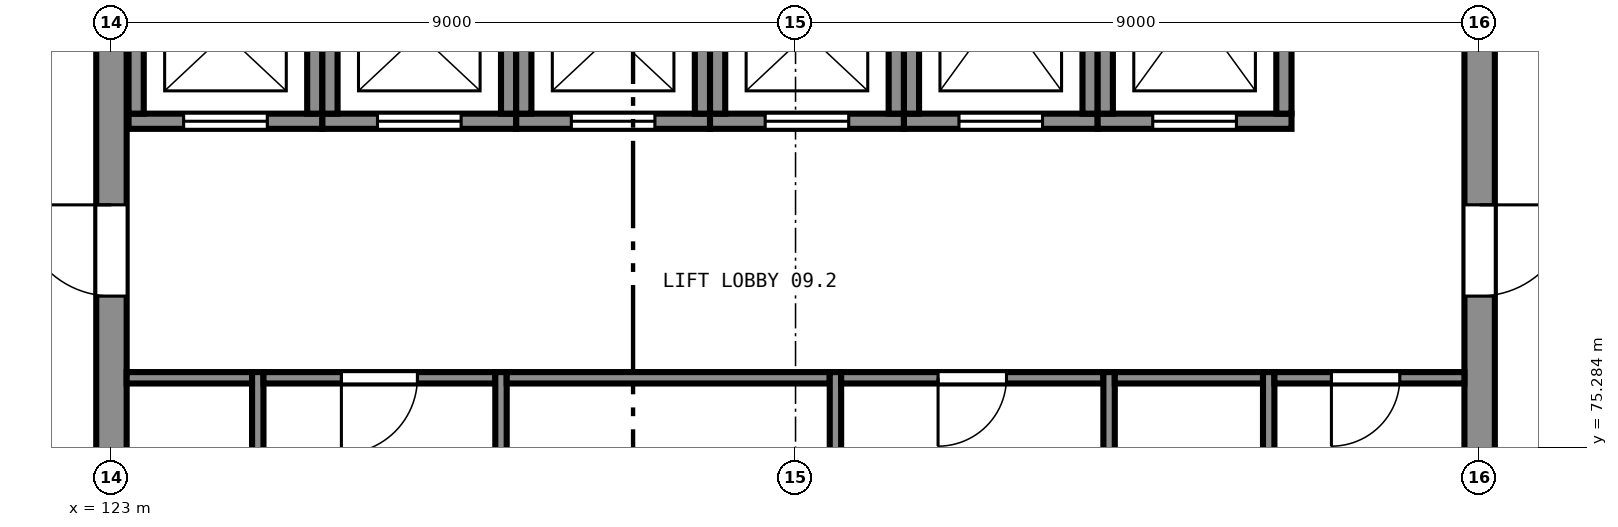
"""IFC4 building model, lengths in metres.
Left out: names, types, materials, properties, quantities, classifications, styles, units other than length and angle.
Written with IfcOpenShell. Run it as: python <this file> out.ifc"""

import sys

from ifc_helpers import new_model, si_unit, direction, frame, frame_2d, origin, place, context, subcontext, project, spatial, rectangle, extrude, element, fill, save


model = new_model("IFC4")
c1 = context("Model", 3, precision=1e-05, world=origin(), true_north=direction((0.0, 1.0)))
c2 = subcontext(c1, "Body", "Model", "MODEL_VIEW")
j1 = project(units=[si_unit("LENGTHUNIT", "METRE"), si_unit("PLANEANGLEUNIT", "RADIAN")], contexts=[c1])
p1 = place(None, origin())
s1 = spatial("IfcSite", under=j1, at=p1, CompositionType="ELEMENT")
p2 = place(p1, origin())
s2 = spatial("IfcBuilding", under=s1, at=p2, CompositionType="ELEMENT")
p3 = place(p2, frame((0.0, 0.0, 37.5)))
s3 = spatial("IfcBuildingStorey", under=s2, at=p3, CompositionType="ELEMENT", Elevation=37.5)
p4 = place(p3, frame((141.0, 65.2, 0.0), z_axis=(0.0, 0.0, 1.0), x_axis=(0.0, 1.0, 0.0)))
e1 = element("IfcWall", 1, at=p4, inside=s3, PredefinedType="SHEAR", context=c2, shape_type="SweptSolid", body=[
    extrude(rectangle(XDim=17.6, YDim=0.4, at=frame_2d((8.8, 0.0))), origin(), (0.0, 0.0, 1.0), 4.0),
])
p5 = place(p4, frame((4.325, 0.0, 0.0)))
e2 = element("IfcOpeningElement", 2, at=p5, cuts=e1, PredefinedType="OPENING", context=c2, shape_type="SweptSolid", body=[
    extrude(rectangle(XDim=1.2, YDim=2.1, at=frame_2d((0.6, 1.05))), frame((0.0, 0.21, 0.0), z_axis=(0.0, -1.0, 0.0), x_axis=(1.0, 0.0, 0.0)), (0.0, 0.0, 1.0), 0.42),
])
p6 = place(p4, frame((12.075, 0.0, 0.0)))
e3 = element("IfcOpeningElement", 3, at=p6, cuts=e1, PredefinedType="OPENING", context=c2, shape_type="SweptSolid", body=[
    extrude(rectangle(XDim=1.2, YDim=2.1, at=frame_2d((0.6, 1.05))), frame((0.0, 0.21, 0.0), z_axis=(0.0, -1.0, 0.0), x_axis=(1.0, 0.0, 0.0)), (0.0, 0.0, 1.0), 0.42),
])
p7 = place(p3, frame((123.0, 82.8, 0.0), z_axis=(0.0, 0.0, 1.0), x_axis=(0.0, -1.0, 0.0)))
e4 = element("IfcWall", 4, at=p7, inside=s3, PredefinedType="SHEAR", context=c2, shape_type="SweptSolid", body=[
    extrude(rectangle(XDim=17.6, YDim=0.4, at=frame_2d((8.8, 0.0))), origin(), (0.0, 0.0, 1.0), 4.0),
])
p8 = place(p7, frame((12.075, 0.0, 0.0)))
e5 = element("IfcOpeningElement", 5, at=p8, cuts=e4, PredefinedType="OPENING", context=c2, shape_type="SweptSolid", body=[
    extrude(rectangle(XDim=1.2, YDim=2.1, at=frame_2d((0.6, 1.05))), frame((0.0, 0.21, 0.0), z_axis=(0.0, -1.0, 0.0), x_axis=(1.0, 0.0, 0.0)), (0.0, 0.0, 1.0), 0.42),
])
p9 = place(p7, frame((4.325, 0.0, 0.0)))
e6 = element("IfcOpeningElement", 6, at=p9, cuts=e4, PredefinedType="OPENING", context=c2, shape_type="SweptSolid", body=[
    extrude(rectangle(XDim=1.2, YDim=2.1, at=frame_2d((0.6, 1.05))), frame((0.0, 0.21, 0.0), z_axis=(0.0, -1.0, 0.0), x_axis=(1.0, 0.0, 0.0)), (0.0, 0.0, 1.0), 0.42),
])
p10 = place(p3, frame((123.225, 79.575, 0.0), z_axis=(0.0, 0.0, 1.0), x_axis=(1.0, 0.0, 0.0)))
e7 = element("IfcWall", 7, at=p10, inside=s3, PredefinedType="SHEAR", context=c2, shape_type="SweptSolid", body=[
    extrude(rectangle(XDim=2.55, YDim=0.2, at=frame_2d((1.275, 0.0))), origin(), (0.0, 0.0, 1.0), 4.0),
])
p11 = place(p10, frame((0.725, 0.0, 0.0)))
e8 = element("IfcOpeningElement", 8, at=p11, cuts=e7, PredefinedType="OPENING", context=c2, shape_type="SweptSolid", body=[
    extrude(rectangle(XDim=1.1, YDim=2.1, at=frame_2d((0.55, 1.05))), frame((0.0, 0.11, 0.0), z_axis=(0.0, -1.0, 0.0), x_axis=(1.0, 0.0, 0.0)), (0.0, 0.0, 1.0), 0.22),
])
for number, where, z_axis, x_axis in (
    (9, (125.675, 79.675, 0.0), (0.0, 0.0, 1.0), (0.0, 1.0, 0.0)),
    (10, (123.325, 81.775, 0.0), (0.0, 0.0, 1.0), (0.0, -1.0, 0.0)),
):
    element("IfcWall", number, at=place(p3, frame(where, z_axis=z_axis, x_axis=x_axis)), inside=s3, PredefinedType="SHEAR", context=c2, shape_type="SweptSolid", body=[
        extrude(rectangle(XDim=2.1, YDim=0.2, at=frame_2d((1.05, 0.0))), origin(), (0.0, 0.0, 1.0), 4.0),
    ])
p12 = place(p3, frame((125.775, 79.575, 0.0), z_axis=(0.0, 0.0, 1.0), x_axis=(1.0, 0.0, 0.0)))
e11 = element("IfcWall", 11, at=p12, inside=s3, PredefinedType="SHEAR", context=c2, shape_type="SweptSolid", body=[
    extrude(rectangle(XDim=2.55, YDim=0.2, at=frame_2d((1.275, 0.0))), origin(), (0.0, 0.0, 1.0), 4.0),
])
p13 = place(p12, frame((0.725, 0.0, 0.0)))
e12 = element("IfcOpeningElement", 12, at=p13, cuts=e11, PredefinedType="OPENING", context=c2, shape_type="SweptSolid", body=[
    extrude(rectangle(XDim=1.1, YDim=2.1, at=frame_2d((0.55, 1.05))), frame((0.0, 0.11, 0.0), z_axis=(0.0, -1.0, 0.0), x_axis=(1.0, 0.0, 0.0)), (0.0, 0.0, 1.0), 0.22),
])
for number, where, z_axis, x_axis in (
    (13, (128.225, 79.675, 0.0), (0.0, 0.0, 1.0), (0.0, 1.0, 0.0)),
    (14, (125.875, 81.775, 0.0), (0.0, 0.0, 1.0), (0.0, -1.0, 0.0)),
):
    element("IfcWall", number, at=place(p3, frame(where, z_axis=z_axis, x_axis=x_axis)), inside=s3, PredefinedType="SHEAR", context=c2, shape_type="SweptSolid", body=[
        extrude(rectangle(XDim=2.1, YDim=0.2, at=frame_2d((1.05, 0.0))), origin(), (0.0, 0.0, 1.0), 4.0),
    ])
p14 = place(p3, frame((128.325, 79.575, 0.0), z_axis=(0.0, 0.0, 1.0), x_axis=(1.0, 0.0, 0.0)))
e15 = element("IfcWall", 15, at=p14, inside=s3, PredefinedType="SHEAR", context=c2, shape_type="SweptSolid", body=[
    extrude(rectangle(XDim=2.55, YDim=0.2, at=frame_2d((1.275, 0.0))), origin(), (0.0, 0.0, 1.0), 4.0),
])
p15 = place(p14, frame((0.725, 0.0, 0.0)))
e16 = element("IfcOpeningElement", 16, at=p15, cuts=e15, PredefinedType="OPENING", context=c2, shape_type="SweptSolid", body=[
    extrude(rectangle(XDim=1.1, YDim=2.1, at=frame_2d((0.55, 1.05))), frame((0.0, 0.11, 0.0), z_axis=(0.0, -1.0, 0.0), x_axis=(1.0, 0.0, 0.0)), (0.0, 0.0, 1.0), 0.22),
])
for number, where, z_axis, x_axis in (
    (17, (130.775, 79.675, 0.0), (0.0, 0.0, 1.0), (0.0, 1.0, 0.0)),
    (18, (128.425, 81.775, 0.0), (0.0, 0.0, 1.0), (0.0, -1.0, 0.0)),
):
    element("IfcWall", number, at=place(p3, frame(where, z_axis=z_axis, x_axis=x_axis)), inside=s3, PredefinedType="SHEAR", context=c2, shape_type="SweptSolid", body=[
        extrude(rectangle(XDim=2.1, YDim=0.2, at=frame_2d((1.05, 0.0))), origin(), (0.0, 0.0, 1.0), 4.0),
    ])
p16 = place(p3, frame((130.875, 79.575, 0.0), z_axis=(0.0, 0.0, 1.0), x_axis=(1.0, 0.0, 0.0)))
e19 = element("IfcWall", 19, at=p16, inside=s3, PredefinedType="SHEAR", context=c2, shape_type="SweptSolid", body=[
    extrude(rectangle(XDim=2.55, YDim=0.2, at=frame_2d((1.275, 0.0))), origin(), (0.0, 0.0, 1.0), 4.0),
])
p17 = place(p16, frame((0.725, 0.0, 0.0)))
e20 = element("IfcOpeningElement", 20, at=p17, cuts=e19, PredefinedType="OPENING", context=c2, shape_type="SweptSolid", body=[
    extrude(rectangle(XDim=1.1, YDim=2.1, at=frame_2d((0.55, 1.05))), frame((0.0, 0.11, 0.0), z_axis=(0.0, -1.0, 0.0), x_axis=(1.0, 0.0, 0.0)), (0.0, 0.0, 1.0), 0.22),
])
for number, where, z_axis, x_axis in (
    (21, (133.325, 79.675, 0.0), (0.0, 0.0, 1.0), (0.0, 1.0, 0.0)),
    (22, (130.975, 81.775, 0.0), (0.0, 0.0, 1.0), (0.0, -1.0, 0.0)),
):
    element("IfcWall", number, at=place(p3, frame(where, z_axis=z_axis, x_axis=x_axis)), inside=s3, PredefinedType="SHEAR", context=c2, shape_type="SweptSolid", body=[
        extrude(rectangle(XDim=2.1, YDim=0.2, at=frame_2d((1.05, 0.0))), origin(), (0.0, 0.0, 1.0), 4.0),
    ])
p18 = place(p3, frame((133.425, 79.575, 0.0), z_axis=(0.0, 0.0, 1.0), x_axis=(1.0, 0.0, 0.0)))
e23 = element("IfcWall", 23, at=p18, inside=s3, PredefinedType="SHEAR", context=c2, shape_type="SweptSolid", body=[
    extrude(rectangle(XDim=2.55, YDim=0.2, at=frame_2d((1.275, 0.0))), origin(), (0.0, 0.0, 1.0), 4.0),
])
p19 = place(p18, frame((0.725, 0.0, 0.0)))
e24 = element("IfcOpeningElement", 24, at=p19, cuts=e23, PredefinedType="OPENING", context=c2, shape_type="SweptSolid", body=[
    extrude(rectangle(XDim=1.1, YDim=2.1, at=frame_2d((0.55, 1.05))), frame((0.0, 0.11, 0.0), z_axis=(0.0, -1.0, 0.0), x_axis=(1.0, 0.0, 0.0)), (0.0, 0.0, 1.0), 0.22),
])
for number, where, z_axis, x_axis in (
    (25, (135.875, 79.675, 0.0), (0.0, 0.0, 1.0), (0.0, 1.0, 0.0)),
    (26, (133.525, 82.475, 0.0), (0.0, 0.0, 1.0), (0.0, -1.0, 0.0)),
):
    element("IfcWall", number, at=place(p3, frame(where, z_axis=z_axis, x_axis=x_axis)), inside=s3, PredefinedType="SHEAR", context=c2, shape_type="SweptSolid", body=[
        extrude(rectangle(XDim=2.8, YDim=0.2, at=frame_2d((1.4, 0.0))), origin(), (0.0, 0.0, 1.0), 4.0),
    ])
p20 = place(p3, frame((135.975, 79.575, 0.0), z_axis=(0.0, 0.0, 1.0), x_axis=(1.0, 0.0, 0.0)))
e27 = element("IfcWall", 27, at=p20, inside=s3, PredefinedType="SHEAR", context=c2, shape_type="SweptSolid", body=[
    extrude(rectangle(XDim=2.55, YDim=0.2, at=frame_2d((1.275, 0.0))), origin(), (0.0, 0.0, 1.0), 4.0),
])
p21 = place(p20, frame((0.725, 0.0, 0.0)))
e28 = element("IfcOpeningElement", 28, at=p21, cuts=e27, PredefinedType="OPENING", context=c2, shape_type="SweptSolid", body=[
    extrude(rectangle(XDim=1.1, YDim=2.1, at=frame_2d((0.55, 1.05))), frame((0.0, 0.11, 0.0), z_axis=(0.0, -1.0, 0.0), x_axis=(1.0, 0.0, 0.0)), (0.0, 0.0, 1.0), 0.22),
])
for number, where, z_axis, x_axis in (
    (29, (138.425, 79.675, 0.0), (0.0, 0.0, 1.0), (0.0, 1.0, 0.0)),
    (30, (136.075, 82.475, 0.0), (0.0, 0.0, 1.0), (0.0, -1.0, 0.0)),
):
    element("IfcWall", number, at=place(p3, frame(where, z_axis=z_axis, x_axis=x_axis)), inside=s3, PredefinedType="SHEAR", context=c2, shape_type="SweptSolid", body=[
        extrude(rectangle(XDim=2.8, YDim=0.2, at=frame_2d((1.4, 0.0))), origin(), (0.0, 0.0, 1.0), 4.0),
    ])
p22 = place(p3, frame((124.925, 71.725, 0.0), z_axis=(0.0, 0.0, 1.0), x_axis=(0.0, 1.0, 0.0)))
e31 = element("IfcWall", 31, at=p22, inside=s3, PredefinedType="PARTITIONING", context=c2, shape_type="SweptSolid", body=[
    extrude(rectangle(XDim=4.55, YDim=0.15, at=frame_2d((2.275, 0.0))), origin(), (0.0, 0.0, 1.0), 3.58),
])
p23 = place(p3, frame((123.2, 76.2, 0.0), z_axis=(0.0, 0.0, 1.0), x_axis=(1.0, 0.0, 0.0)))
e32 = element("IfcWall", 32, at=p23, inside=s3, PredefinedType="PARTITIONING", context=c2, shape_type="SweptSolid", body=[
    extrude(rectangle(XDim=1.65, YDim=0.15, at=frame_2d((0.825, 0.0))), origin(), (0.0, 0.0, 1.0), 3.58),
])
p24 = place(p3, frame((128.125, 71.725, 0.0), z_axis=(0.0, 0.0, 1.0), x_axis=(0.0, 1.0, 0.0)))
e33 = element("IfcWall", 33, at=p24, inside=s3, PredefinedType="PARTITIONING", context=c2, shape_type="SweptSolid", body=[
    extrude(rectangle(XDim=4.55, YDim=0.15, at=frame_2d((2.275, 0.0))), origin(), (0.0, 0.0, 1.0), 3.58),
])
p25 = place(p3, frame((125.0, 76.2, 0.0), z_axis=(0.0, 0.0, 1.0), x_axis=(1.0, 0.0, 0.0)))
e34 = element("IfcWall", 34, at=p25, inside=s3, PredefinedType="PARTITIONING", context=c2, shape_type="SweptSolid", body=[
    extrude(rectangle(XDim=3.05, YDim=0.15, at=frame_2d((1.525, 0.0))), origin(), (0.0, 0.0, 1.0), 3.58),
])
p26 = place(p25, frame((1.025, 0.0, 0.0)))
e35 = element("IfcOpeningElement", 35, at=p26, cuts=e34, PredefinedType="OPENING", context=c2, shape_type="SweptSolid", body=[
    extrude(rectangle(XDim=1.0, YDim=2.1, at=frame_2d((0.5, 1.05))), frame((0.0, 0.085, 0.0), z_axis=(0.0, -1.0, 0.0), x_axis=(1.0, 0.0, 0.0)), (0.0, 0.0, 1.0), 0.17),
])
p27 = place(p3, frame((132.525, 71.725, 0.0), z_axis=(0.0, 0.0, 1.0), x_axis=(0.0, 1.0, 0.0)))
e36 = element("IfcWall", 36, at=p27, inside=s3, PredefinedType="PARTITIONING", context=c2, shape_type="SweptSolid", body=[
    extrude(rectangle(XDim=4.55, YDim=0.15, at=frame_2d((2.275, 0.0))), origin(), (0.0, 0.0, 1.0), 3.58),
])
p28 = place(p3, frame((128.2, 76.2, 0.0), z_axis=(0.0, 0.0, 1.0), x_axis=(1.0, 0.0, 0.0)))
e37 = element("IfcWall", 37, at=p28, inside=s3, PredefinedType="PARTITIONING", context=c2, shape_type="SweptSolid", body=[
    extrude(rectangle(XDim=4.25, YDim=0.15, at=frame_2d((2.125, 0.0))), origin(), (0.0, 0.0, 1.0), 3.58),
])
p29 = place(p3, frame((136.125, 71.725, 0.0), z_axis=(0.0, 0.0, 1.0), x_axis=(0.0, 1.0, 0.0)))
e38 = element("IfcWall", 38, at=p29, inside=s3, PredefinedType="PARTITIONING", context=c2, shape_type="SweptSolid", body=[
    extrude(rectangle(XDim=4.55, YDim=0.15, at=frame_2d((2.275, 0.0))), origin(), (0.0, 0.0, 1.0), 3.58),
])
p30 = place(p3, frame((132.6, 76.2, 0.0), z_axis=(0.0, 0.0, 1.0), x_axis=(1.0, 0.0, 0.0)))
e39 = element("IfcWall", 39, at=p30, inside=s3, PredefinedType="PARTITIONING", context=c2, shape_type="SweptSolid", body=[
    extrude(rectangle(XDim=3.45, YDim=0.15, at=frame_2d((1.725, 0.0))), origin(), (0.0, 0.0, 1.0), 3.58),
])
p31 = place(p30, frame((1.275, 0.0, 0.0)))
e40 = element("IfcOpeningElement", 40, at=p31, cuts=e39, PredefinedType="OPENING", context=c2, shape_type="SweptSolid", body=[
    extrude(rectangle(XDim=0.9, YDim=2.1, at=frame_2d((0.45, 1.05))), frame((0.0, 0.085, 0.0), z_axis=(0.0, -1.0, 0.0), x_axis=(1.0, 0.0, 0.0)), (0.0, 0.0, 1.0), 0.17),
])
p32 = place(p3, frame((138.225, 71.725, 0.0), z_axis=(0.0, 0.0, 1.0), x_axis=(0.0, 1.0, 0.0)))
e41 = element("IfcWall", 41, at=p32, inside=s3, PredefinedType="PARTITIONING", context=c2, shape_type="SweptSolid", body=[
    extrude(rectangle(XDim=4.55, YDim=0.15, at=frame_2d((2.275, 0.0))), origin(), (0.0, 0.0, 1.0), 3.58),
])
p33 = place(p3, frame((136.2, 76.2, 0.0), z_axis=(0.0, 0.0, 1.0), x_axis=(1.0, 0.0, 0.0)))
e42 = element("IfcWall", 42, at=p33, inside=s3, PredefinedType="PARTITIONING", context=c2, shape_type="SweptSolid", body=[
    extrude(rectangle(XDim=1.95, YDim=0.15, at=frame_2d((0.975, 0.0))), origin(), (0.0, 0.0, 1.0), 3.58),
])
p34 = place(p3, frame((138.3, 76.2, 0.0), z_axis=(0.0, 0.0, 1.0), x_axis=(1.0, 0.0, 0.0)))
e43 = element("IfcWall", 43, at=p34, inside=s3, PredefinedType="PARTITIONING", context=c2, shape_type="SweptSolid", body=[
    extrude(rectangle(XDim=2.5, YDim=0.15, at=frame_2d((1.25, 0.0))), origin(), (0.0, 0.0, 1.0), 3.58),
])
p35 = place(p34, frame((0.75, 0.0, 0.0)))
e44 = element("IfcOpeningElement", 44, at=p35, cuts=e43, PredefinedType="OPENING", context=c2, shape_type="SweptSolid", body=[
    extrude(rectangle(XDim=0.9, YDim=2.1, at=frame_2d((0.45, 1.05))), frame((0.0, 0.085, 0.0), z_axis=(0.0, -1.0, 0.0), x_axis=(1.0, 0.0, 0.0)), (0.0, 0.0, 1.0), 0.17),
])
p36 = place(p11, origin())
e45 = element("IfcDoor", 45, at=p36, inside=s3, OperationType="SLIDING_TO_LEFT", PredefinedType="DOOR", context=c2, shape_type="SweptSolid", body=[
    extrude(rectangle(XDim=1.1, YDim=2.1, at=frame_2d((0.55, 1.05))), frame((0.0, 0.025, 0.0), z_axis=(0.0, -1.0, 0.0), x_axis=(1.0, 0.0, 0.0)), (0.0, 0.0, 1.0), 0.05),
])
fill(e8, e45)
p37 = place(p13, origin())
e46 = element("IfcDoor", 46, at=p37, inside=s3, OperationType="SLIDING_TO_LEFT", PredefinedType="DOOR", context=c2, shape_type="SweptSolid", body=[
    extrude(rectangle(XDim=1.1, YDim=2.1, at=frame_2d((0.55, 1.05))), frame((0.0, 0.025, 0.0), z_axis=(0.0, -1.0, 0.0), x_axis=(1.0, 0.0, 0.0)), (0.0, 0.0, 1.0), 0.05),
])
fill(e12, e46)
p38 = place(p15, origin())
e47 = element("IfcDoor", 47, at=p38, inside=s3, OperationType="SLIDING_TO_LEFT", PredefinedType="DOOR", context=c2, shape_type="SweptSolid", body=[
    extrude(rectangle(XDim=1.1, YDim=2.1, at=frame_2d((0.55, 1.05))), frame((0.0, 0.025, 0.0), z_axis=(0.0, -1.0, 0.0), x_axis=(1.0, 0.0, 0.0)), (0.0, 0.0, 1.0), 0.05),
])
fill(e16, e47)
p39 = place(p17, origin())
e48 = element("IfcDoor", 48, at=p39, inside=s3, OperationType="SLIDING_TO_LEFT", PredefinedType="DOOR", context=c2, shape_type="SweptSolid", body=[
    extrude(rectangle(XDim=1.1, YDim=2.1, at=frame_2d((0.55, 1.05))), frame((0.0, 0.025, 0.0), z_axis=(0.0, -1.0, 0.0), x_axis=(1.0, 0.0, 0.0)), (0.0, 0.0, 1.0), 0.05),
])
fill(e20, e48)
p40 = place(p19, origin())
e49 = element("IfcDoor", 49, at=p40, inside=s3, OperationType="SLIDING_TO_LEFT", PredefinedType="DOOR", context=c2, shape_type="SweptSolid", body=[
    extrude(rectangle(XDim=1.1, YDim=2.1, at=frame_2d((0.55, 1.05))), frame((0.0, 0.025, 0.0), z_axis=(0.0, -1.0, 0.0), x_axis=(1.0, 0.0, 0.0)), (0.0, 0.0, 1.0), 0.05),
])
fill(e24, e49)
p41 = place(p21, origin())
e50 = element("IfcDoor", 50, at=p41, inside=s3, OperationType="SLIDING_TO_LEFT", PredefinedType="DOOR", context=c2, shape_type="SweptSolid", body=[
    extrude(rectangle(XDim=1.1, YDim=2.1, at=frame_2d((0.55, 1.05))), frame((0.0, 0.025, 0.0), z_axis=(0.0, -1.0, 0.0), x_axis=(1.0, 0.0, 0.0)), (0.0, 0.0, 1.0), 0.05),
])
fill(e28, e50)
p42 = place(p9, frame((1.2, 0.0, 0.0), z_axis=(0.0, 0.0, 1.0), x_axis=(-1.0, 0.0, 0.0)))
e51 = element("IfcDoor", 51, at=p42, inside=s3, OperationType="SINGLE_SWING_LEFT", PredefinedType="DOOR", context=c2, shape_type="SweptSolid", body=[
    extrude(rectangle(XDim=1.2, YDim=2.1, at=frame_2d((0.6, 1.05))), frame((0.0, 0.025, 0.0), z_axis=(0.0, -1.0, 0.0), x_axis=(1.0, 0.0, 0.0)), (0.0, 0.0, 1.0), 0.05),
])
fill(e6, e51)
p43 = place(p6, frame((1.2, 0.0, 0.0), z_axis=(0.0, 0.0, 1.0), x_axis=(-1.0, 0.0, 0.0)))
e52 = element("IfcDoor", 52, at=p43, inside=s3, OperationType="SINGLE_SWING_RIGHT", PredefinedType="DOOR", context=c2, shape_type="SweptSolid", body=[
    extrude(rectangle(XDim=1.2, YDim=2.1, at=frame_2d((0.6, 1.05))), frame((0.0, 0.025, 0.0), z_axis=(0.0, -1.0, 0.0), x_axis=(1.0, 0.0, 0.0)), (0.0, 0.0, 1.0), 0.05),
])
fill(e3, e52)
p44 = place(p26, frame((1.0, 0.0, 0.0), z_axis=(0.0, 0.0, 1.0), x_axis=(-1.0, 0.0, 0.0)))
e53 = element("IfcDoor", 53, at=p44, inside=s3, OperationType="SINGLE_SWING_LEFT", PredefinedType="DOOR", context=c2, shape_type="SweptSolid", body=[
    extrude(rectangle(XDim=1.0, YDim=2.1, at=frame_2d((0.5, 1.05))), frame((0.0, 0.025, 0.0), z_axis=(0.0, -1.0, 0.0), x_axis=(1.0, 0.0, 0.0)), (0.0, 0.0, 1.0), 0.05),
])
fill(e35, e53)
p45 = place(p31, frame((0.9, 0.0, 0.0), z_axis=(0.0, 0.0, 1.0), x_axis=(-1.0, 0.0, 0.0)))
e54 = element("IfcDoor", 54, at=p45, inside=s3, OperationType="SINGLE_SWING_LEFT", PredefinedType="DOOR", context=c2, shape_type="SweptSolid", body=[
    extrude(rectangle(XDim=0.9, YDim=2.1, at=frame_2d((0.45, 1.05))), frame((0.0, 0.025, 0.0), z_axis=(0.0, -1.0, 0.0), x_axis=(1.0, 0.0, 0.0)), (0.0, 0.0, 1.0), 0.05),
])
fill(e40, e54)
p46 = place(p35, frame((0.9, 0.0, 0.0), z_axis=(0.0, 0.0, 1.0), x_axis=(-1.0, 0.0, 0.0)))
e55 = element("IfcDoor", 55, at=p46, inside=s3, OperationType="SINGLE_SWING_LEFT", PredefinedType="DOOR", context=c2, shape_type="SweptSolid", body=[
    extrude(rectangle(XDim=0.9, YDim=2.1, at=frame_2d((0.45, 1.05))), frame((0.0, 0.025, 0.0), z_axis=(0.0, -1.0, 0.0), x_axis=(1.0, 0.0, 0.0)), (0.0, 0.0, 1.0), 0.05),
])
fill(e44, e55)
save(model, sys.argv[1])
